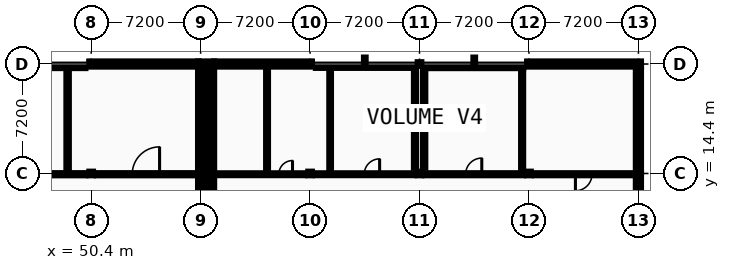
"""IFC4 building model, lengths in metres.
Left out: names, types, materials, properties, quantities, classifications, styles, units other than length and angle.
Written with IfcOpenShell. Run it as: python <this file> out.ifc"""

import sys

from ifc_helpers import new_model, si_unit, direction, frame, frame_2d, origin, origin_2d, place, context, subcontext, project, spatial, rectangle, i_section, extrude, element, fill, save


model = new_model("IFC4")
c1 = context("Model", 3, precision=1e-05, world=origin(), true_north=direction((0.0, 1.0)))
c2 = subcontext(c1, "Body", "Model", "MODEL_VIEW")
j1 = project(units=[si_unit("LENGTHUNIT", "METRE"), si_unit("PLANEANGLEUNIT", "RADIAN")], contexts=[c1])
p1 = place(None, origin())
s1 = spatial("IfcSite", under=j1, at=p1, CompositionType="ELEMENT")
p2 = place(p1, origin())
s2 = spatial("IfcBuilding", under=s1, at=p2, CompositionType="ELEMENT")
p3 = place(p2, frame((0.0, 0.0, 18.4)))
s3 = spatial("IfcBuildingStorey", under=s2, at=p3, CompositionType="ELEMENT", Elevation=18.4)
for number, where, z_axis, x_axis in (
    (1, (50.4, 14.4, 0.0), (0.0, 0.0, 1.0), (1.0, 0.0, 0.0)),
    (2, (50.4, 21.6, 0.0), (0.0, 0.0, 1.0), (1.0, 0.0, 0.0)),
    (3, (57.6, 14.4, 0.0), (0.0, 0.0, 1.0), (1.0, 0.0, 0.0)),
    (4, (57.6, 21.6, 0.0), (0.0, 0.0, 1.0), (1.0, 0.0, 0.0)),
    (5, (58.32, 14.4, 0.0), (0.0, 0.0, 1.0), (1.0, 0.0, 0.0)),
    (6, (58.32, 21.6, 0.0), (0.0, 0.0, 1.0), (1.0, 0.0, 0.0)),
    (7, (64.8, 14.4, 0.0), (0.0, 0.0, 1.0), (1.0, 0.0, 0.0)),
    (8, (64.8, 21.6, 0.0), (0.0, 0.0, 1.0), (1.0, 0.0, 0.0)),
    (9, (72.0, 14.4, 0.0), (0.0, 0.0, 1.0), (1.0, 0.0, 0.0)),
    (10, (72.0, 21.6, 0.0), (0.0, 0.0, 1.0), (1.0, 0.0, 0.0)),
    (11, (79.2, 14.4, 0.0), (0.0, 0.0, 1.0), (1.0, 0.0, 0.0)),
    (12, (79.2, 21.6, 0.0), (0.0, 0.0, 1.0), (1.0, 0.0, 0.0)),
    (13, (86.4, 14.4, 0.0), (0.0, 0.0, 1.0), (1.0, 0.0, 0.0)),
    (14, (86.4, 21.6, 0.0), (0.0, 0.0, 1.0), (1.0, 0.0, 0.0)),
):
    element("IfcColumn", number, at=place(p3, frame(where, z_axis=z_axis, x_axis=x_axis)), inside=s3, PredefinedType="COLUMN", context=c2, shape_type="SweptSolid", body=[
        extrude(i_section(OverallWidth=0.24, OverallDepth=0.24, WebThickness=0.01, FlangeThickness=0.017, FilletRadius=0.021, at=origin_2d()), origin(), (0.0, 0.0, 1.0), 4.4),
    ])
p4 = place(p3, frame((57.43, 21.6, 0.0), z_axis=(0.0, 0.0, 1.0), x_axis=(-1.0, 0.0, 0.0)))
e15 = element("IfcWall", 15, at=p4, inside=s3, PredefinedType="STANDARD", context=c2, shape_type="SweptSolid", body=[
    extrude(rectangle(XDim=7.14, YDim=0.34, at=frame_2d((3.57, 0.0))), origin(), (0.0, 0.0, 1.0), 4.035),
])
p5 = place(p4, frame((1.542, 0.0, 0.95)))
e16 = element("IfcOpeningElement", 16, at=p5, cuts=e15, PredefinedType="OPENING", context=c2, shape_type="SweptSolid", body=[
    extrude(rectangle(XDim=1.2, YDim=1.404, at=frame_2d((0.6, 0.702))), frame((0.0, 0.18, 0.0), z_axis=(0.0, -1.0, 0.0), x_axis=(1.0, 0.0, 0.0)), (0.0, 0.0, 1.0), 0.36),
])
p6 = place(p4, frame((4.398, 0.0, 0.95)))
e17 = element("IfcOpeningElement", 17, at=p6, cuts=e15, PredefinedType="OPENING", context=c2, shape_type="SweptSolid", body=[
    extrude(rectangle(XDim=1.2, YDim=1.404, at=frame_2d((0.6, 0.702))), frame((0.0, 0.18, 0.0), z_axis=(0.0, -1.0, 0.0), x_axis=(1.0, 0.0, 0.0)), (0.0, 0.0, 1.0), 0.36),
])
p7 = place(p3, frame((57.6, 8.9, 0.0), z_axis=(0.0, 0.0, 1.0), x_axis=(0.0, 1.0, 0.0)))
e18 = element("IfcWall", 18, at=p7, inside=s3, PredefinedType="STANDARD", context=c2, shape_type="SweptSolid", body=[
    extrude(rectangle(XDim=5.5, YDim=0.34, at=frame_2d((2.75, 0.0))), origin(), (0.0, 0.0, 1.0), 4.11),
])
p8 = place(p3, frame((57.6, 14.4, 0.0), z_axis=(0.0, 0.0, 1.0), x_axis=(0.0, 1.0, 0.0)))
e19 = element("IfcWall", 19, at=p8, inside=s3, PredefinedType="STANDARD", context=c2, shape_type="SweptSolid", body=[
    extrude(rectangle(XDim=7.37, YDim=0.34, at=frame_2d((3.685, 0.0))), origin(), (0.0, 0.0, 1.0), 4.11),
])
p9 = place(p8, frame((1.311, 0.0, 0.95)))
e20 = element("IfcOpeningElement", 20, at=p9, cuts=e19, PredefinedType="OPENING", context=c2, shape_type="SweptSolid", body=[
    extrude(rectangle(XDim=1.8, YDim=1.85, at=frame_2d((0.9, 0.925))), frame((0.0, 0.18, 0.0), z_axis=(0.0, -1.0, 0.0), x_axis=(1.0, 0.0, 0.0)), (0.0, 0.0, 1.0), 0.36),
])
p10 = place(p8, frame((4.259, 0.0, 0.95)))
e21 = element("IfcOpeningElement", 21, at=p10, cuts=e19, PredefinedType="OPENING", context=c2, shape_type="SweptSolid", body=[
    extrude(rectangle(XDim=1.8, YDim=1.85, at=frame_2d((0.9, 0.925))), frame((0.0, 0.18, 0.0), z_axis=(0.0, -1.0, 0.0), x_axis=(1.0, 0.0, 0.0)), (0.0, 0.0, 1.0), 0.36),
])
p11 = place(p3, frame((64.91, 21.6, 0.0), z_axis=(0.0, 0.0, 1.0), x_axis=(-1.0, 0.0, 0.0)))
e22 = element("IfcWall", 22, at=p11, inside=s3, PredefinedType="STANDARD", context=c2, shape_type="SweptSolid", body=[
    extrude(rectangle(XDim=6.42, YDim=0.34, at=frame_2d((3.21, 0.0))), origin(), (0.0, 0.0, 1.0), 4.035),
])
p12 = place(p3, frame((86.57, 21.6, 0.0), z_axis=(0.0, 0.0, 1.0), x_axis=(-1.0, 0.0, 0.0)))
e23 = element("IfcWall", 23, at=p12, inside=s3, PredefinedType="STANDARD", context=c2, shape_type="SweptSolid", body=[
    extrude(rectangle(XDim=7.48, YDim=0.34, at=frame_2d((3.74, 0.0))), origin(), (0.0, 0.0, 1.0), 4.035),
])
p13 = place(p12, frame((1.661, 0.0, 0.95)))
e24 = element("IfcOpeningElement", 24, at=p13, cuts=e23, PredefinedType="OPENING", context=c2, shape_type="SweptSolid", body=[
    extrude(rectangle(XDim=1.166, YDim=1.368, at=frame_2d((0.583, 0.684))), frame((0.0, 0.18, 0.0), z_axis=(0.0, -1.0, 0.0), x_axis=(1.0, 0.0, 0.0)), (0.0, 0.0, 1.0), 0.36),
])
p14 = place(p12, frame((4.653, 0.0, 0.95)))
e25 = element("IfcOpeningElement", 25, at=p14, cuts=e23, PredefinedType="OPENING", context=c2, shape_type="SweptSolid", body=[
    extrude(rectangle(XDim=1.166, YDim=1.368, at=frame_2d((0.583, 0.684))), frame((0.0, 0.18, 0.0), z_axis=(0.0, -1.0, 0.0), x_axis=(1.0, 0.0, 0.0)), (0.0, 0.0, 1.0), 0.36),
])
p15 = place(p3, frame((58.32, 14.4, 0.0), z_axis=(0.0, 0.0, 1.0), x_axis=(0.0, -1.0, 0.0)))
e26 = element("IfcWall", 26, at=p15, inside=s3, PredefinedType="STANDARD", context=c2, shape_type="SweptSolid", body=[
    extrude(rectangle(XDim=5.5, YDim=0.34, at=frame_2d((2.75, 0.0))), origin(), (0.0, 0.0, 1.0), 4.11),
])
p16 = place(p3, frame((58.32, 21.77, 0.0), z_axis=(0.0, 0.0, 1.0), x_axis=(0.0, -1.0, 0.0)))
e27 = element("IfcWall", 27, at=p16, inside=s3, PredefinedType="STANDARD", context=c2, shape_type="SweptSolid", body=[
    extrude(rectangle(XDim=7.37, YDim=0.34, at=frame_2d((3.685, 0.0))), origin(), (0.0, 0.0, 1.0), 4.11),
])
p17 = place(p16, frame((1.594, 0.0, 0.95)))
e28 = element("IfcOpeningElement", 28, at=p17, cuts=e27, PredefinedType="OPENING", context=c2, shape_type="SweptSolid", body=[
    extrude(rectangle(XDim=1.234, YDim=1.368, at=frame_2d((0.617, 0.684))), frame((0.0, 0.18, 0.0), z_axis=(0.0, -1.0, 0.0), x_axis=(1.0, 0.0, 0.0)), (0.0, 0.0, 1.0), 0.36),
])
p18 = place(p16, frame((4.542, 0.0, 0.95)))
e29 = element("IfcOpeningElement", 29, at=p18, cuts=e27, PredefinedType="OPENING", context=c2, shape_type="SweptSolid", body=[
    extrude(rectangle(XDim=1.234, YDim=1.368, at=frame_2d((0.617, 0.684))), frame((0.0, 0.18, 0.0), z_axis=(0.0, -1.0, 0.0), x_axis=(1.0, 0.0, 0.0)), (0.0, 0.0, 1.0), 0.36),
])
p19 = place(p3, frame((86.4, 8.9, 0.0), z_axis=(0.0, 0.0, 1.0), x_axis=(0.0, 1.0, 0.0)))
e30 = element("IfcWall", 30, at=p19, inside=s3, PredefinedType="STANDARD", context=c2, shape_type="SweptSolid", body=[
    extrude(rectangle(XDim=5.5, YDim=0.34, at=frame_2d((2.75, 0.0))), origin(), (0.0, 0.0, 1.0), 4.11),
])
p20 = place(p3, frame((86.4, 14.4, 0.0), z_axis=(0.0, 0.0, 1.0), x_axis=(0.0, 1.0, 0.0)))
e31 = element("IfcWall", 31, at=p20, inside=s3, PredefinedType="STANDARD", context=c2, shape_type="SweptSolid", body=[
    extrude(rectangle(XDim=7.03, YDim=0.34, at=frame_2d((3.515, 0.0))), origin(), (0.0, 0.0, 1.0), 4.11),
])
p21 = place(p20, frame((1.679, 0.0, 0.95)))
e32 = element("IfcOpeningElement", 32, at=p21, cuts=e31, PredefinedType="OPENING", context=c2, shape_type="SweptSolid", body=[
    extrude(rectangle(XDim=0.86, YDim=1.404, at=frame_2d((0.43, 0.702))), frame((0.0, 0.18, 0.0), z_axis=(0.0, -1.0, 0.0), x_axis=(1.0, 0.0, 0.0)), (0.0, 0.0, 1.0), 0.36),
])
p22 = place(p20, frame((4.491, 0.0, 0.95)))
e33 = element("IfcOpeningElement", 33, at=p22, cuts=e31, PredefinedType="OPENING", context=c2, shape_type="SweptSolid", body=[
    extrude(rectangle(XDim=0.86, YDim=1.404, at=frame_2d((0.43, 0.702))), frame((0.0, 0.18, 0.0), z_axis=(0.0, -1.0, 0.0), x_axis=(1.0, 0.0, 0.0)), (0.0, 0.0, 1.0), 0.36),
])
p23 = place(p3, frame((58.32, 0.2, 4.4), z_axis=(0.0, 0.0, 1.0), x_axis=(0.0, 1.0, 0.0)))
e34 = element("IfcWall", 34, at=p23, inside=s3, PredefinedType="PARAPET", context=c2, shape_type="SweptSolid", body=[
    extrude(rectangle(XDim=21.2, YDim=0.2, at=frame_2d((10.6, 0.0))), origin(), (0.0, 0.0, 1.0), 0.55),
])
p24 = place(p3, frame((43.58, 14.35, 0.0), z_axis=(0.0, 0.0, 1.0), x_axis=(1.0, 0.0, 0.0)))
e35 = element("IfcWall", 35, at=p24, inside=s3, PredefinedType="PARTITIONING", context=c2, shape_type="SweptSolid", body=[
    extrude(rectangle(XDim=6.44, YDim=0.142, at=frame_2d((3.22, 0.0))), origin(), (0.0, 0.0, 1.0), 4.035),
])
p25 = place(p24, frame((2.156, 0.0, 0.0)))
e36 = element("IfcOpeningElement", 36, at=p25, cuts=e35, PredefinedType="OPENING", context=c2, shape_type="SweptSolid", body=[
    extrude(rectangle(XDim=0.958, YDim=2.068, at=frame_2d((0.479, 1.034))), frame((0.0, 0.081, 0.0), z_axis=(0.0, -1.0, 0.0), x_axis=(1.0, 0.0, 0.0)), (0.0, 0.0, 1.0), 0.162),
])
p26 = place(p3, frame((50.78, 14.35, 0.0), z_axis=(0.0, 0.0, 1.0), x_axis=(1.0, 0.0, 0.0)))
e37 = element("IfcWall", 37, at=p26, inside=s3, PredefinedType="PARTITIONING", context=c2, shape_type="SweptSolid", body=[
    extrude(rectangle(XDim=6.44, YDim=0.142, at=frame_2d((3.22, 0.0))), origin(), (0.0, 0.0, 1.0), 4.035),
])
p27 = place(p26, frame((2.32, 0.0, 0.0)))
e38 = element("IfcOpeningElement", 38, at=p27, cuts=e37, PredefinedType="OPENING", context=c2, shape_type="SweptSolid", body=[
    extrude(rectangle(XDim=1.8, YDim=2.3, at=frame_2d((0.9, 1.15))), frame((0.0, 0.081, 0.0), z_axis=(0.0, -1.0, 0.0), x_axis=(1.0, 0.0, 0.0)), (0.0, 0.0, 1.0), 0.162),
])
p28 = place(p3, frame((58.7, 14.35, 0.0), z_axis=(0.0, 0.0, 1.0), x_axis=(1.0, 0.0, 0.0)))
e39 = element("IfcWall", 39, at=p28, inside=s3, PredefinedType="PARTITIONING", context=c2, shape_type="SweptSolid", body=[
    extrude(rectangle(XDim=5.72, YDim=0.125, at=frame_2d((2.86, 0.0))), origin(), (0.0, 0.0, 1.0), 4.035),
])
p29 = place(p28, frame((1.82, 0.0, 0.0)))
e40 = element("IfcOpeningElement", 40, at=p29, cuts=e39, PredefinedType="OPENING", context=c2, shape_type="SweptSolid", body=[
    extrude(rectangle(XDim=1.0, YDim=2.1, at=frame_2d((0.5, 1.05))), frame((0.0, 0.073, 0.0), z_axis=(0.0, -1.0, 0.0), x_axis=(1.0, 0.0, 0.0)), (0.0, 0.0, 1.0), 0.145),
])
p30 = place(p28, frame((4.045, 0.0, 0.0)))
e41 = element("IfcOpeningElement", 41, at=p30, cuts=e39, PredefinedType="OPENING", context=c2, shape_type="SweptSolid", body=[
    extrude(rectangle(XDim=0.9, YDim=2.1, at=frame_2d((0.45, 1.05))), frame((0.0, 0.073, 0.0), z_axis=(0.0, -1.0, 0.0), x_axis=(1.0, 0.0, 0.0)), (0.0, 0.0, 1.0), 0.145),
])
p31 = place(p3, frame((65.18, 14.35, 0.0), z_axis=(0.0, 0.0, 1.0), x_axis=(1.0, 0.0, 0.0)))
e42 = element("IfcWall", 42, at=p31, inside=s3, PredefinedType="PARTITIONING", context=c2, shape_type="SweptSolid", body=[
    extrude(rectangle(XDim=6.44, YDim=0.125, at=frame_2d((3.22, 0.0))), origin(), (0.0, 0.0, 1.0), 4.035),
])
p32 = place(p31, frame((3.185, 0.0, 0.0)))
e43 = element("IfcOpeningElement", 43, at=p32, cuts=e42, PredefinedType="OPENING", context=c2, shape_type="SweptSolid", body=[
    extrude(rectangle(XDim=1.01, YDim=2.068, at=frame_2d((0.505, 1.034))), frame((0.0, 0.073, 0.0), z_axis=(0.0, -1.0, 0.0), x_axis=(1.0, 0.0, 0.0)), (0.0, 0.0, 1.0), 0.145),
])
p33 = place(p3, frame((72.38, 14.35, 0.0), z_axis=(0.0, 0.0, 1.0), x_axis=(1.0, 0.0, 0.0)))
e44 = element("IfcWall", 44, at=p33, inside=s3, PredefinedType="PARTITIONING", context=c2, shape_type="SweptSolid", body=[
    extrude(rectangle(XDim=6.44, YDim=0.135, at=frame_2d((3.22, 0.0))), origin(), (0.0, 0.0, 1.0), 4.035),
])
p34 = place(p33, frame((2.654, 0.0, 0.0)))
e45 = element("IfcOpeningElement", 45, at=p34, cuts=e44, PredefinedType="OPENING", context=c2, shape_type="SweptSolid", body=[
    extrude(rectangle(XDim=1.062, YDim=2.068, at=frame_2d((0.531, 1.034))), frame((0.0, 0.078, 0.0), z_axis=(0.0, -1.0, 0.0), x_axis=(1.0, 0.0, 0.0)), (0.0, 0.0, 1.0), 0.155),
])
p35 = place(p3, frame((79.58, 14.35, 0.0), z_axis=(0.0, 0.0, 1.0), x_axis=(1.0, 0.0, 0.0)))
e46 = element("IfcWall", 46, at=p35, inside=s3, PredefinedType="PARTITIONING", context=c2, shape_type="SweptSolid", body=[
    extrude(rectangle(XDim=6.44, YDim=0.135, at=frame_2d((3.22, 0.0))), origin(), (0.0, 0.0, 1.0), 4.035),
])
p36 = place(p35, frame((2.676, 0.0, 0.0)))
e47 = element("IfcOpeningElement", 47, at=p36, cuts=e46, PredefinedType="OPENING", context=c2, shape_type="SweptSolid", body=[
    extrude(rectangle(XDim=1.088, YDim=2.068, at=frame_2d((0.544, 1.034))), frame((0.0, 0.078, 0.0), z_axis=(0.0, -1.0, 0.0), x_axis=(1.0, 0.0, 0.0)), (0.0, 0.0, 1.0), 0.155),
])
p37 = place(p3, frame((43.58, 21.4, 0.0), z_axis=(0.0, 0.0, 1.0), x_axis=(1.0, 0.0, 0.0)))
e48 = element("IfcWall", 48, at=p37, inside=s3, PredefinedType="PARTITIONING", context=c2, shape_type="SweptSolid", body=[
    extrude(rectangle(XDim=6.44, YDim=0.135, at=frame_2d((3.22, 0.0))), origin(), (0.0, 0.0, 1.0), 4.035),
])
p38 = place(p3, frame((65.18, 21.4, 0.0), z_axis=(0.0, 0.0, 1.0), x_axis=(1.0, 0.0, 0.0)))
e49 = element("IfcWall", 49, at=p38, inside=s3, PredefinedType="PARTITIONING", context=c2, shape_type="SweptSolid", body=[
    extrude(rectangle(XDim=6.44, YDim=0.11, at=frame_2d((3.22, 0.0))), origin(), (0.0, 0.0, 1.0), 4.035),
])
p39 = place(p3, frame((72.38, 21.4, 0.0), z_axis=(0.0, 0.0, 1.0), x_axis=(1.0, 0.0, 0.0)))
e50 = element("IfcWall", 50, at=p39, inside=s3, PredefinedType="PARTITIONING", context=c2, shape_type="SweptSolid", body=[
    extrude(rectangle(XDim=6.44, YDim=0.142, at=frame_2d((3.22, 0.0))), origin(), (0.0, 0.0, 1.0), 4.035),
])
p40 = place(p3, frame((48.85, 14.421, 0.0), z_axis=(0.0, 0.0, 1.0), x_axis=(0.0, 1.0, 0.0)))
e51 = element("IfcWall", 51, at=p40, inside=s3, PredefinedType="PARTITIONING", context=c2, shape_type="SweptSolid", body=[
    extrude(rectangle(XDim=6.912, YDim=0.16, at=frame_2d((3.456, 0.0))), origin(), (0.0, 0.0, 1.0), 4.18),
])
p41 = place(p3, frame((61.97, 14.413, 0.0), z_axis=(0.0, 0.0, 1.0), x_axis=(0.0, 1.0, 0.0)))
e52 = element("IfcWall", 52, at=p41, inside=s3, PredefinedType="PARTITIONING", context=c2, shape_type="SweptSolid", body=[
    extrude(rectangle(XDim=6.987, YDim=0.125, at=frame_2d((3.494, 0.0))), origin(), (0.0, 0.0, 1.0), 4.18),
])
p42 = place(p3, frame((66.12, 14.413, 0.0), z_axis=(0.0, 0.0, 1.0), x_axis=(0.0, 1.0, 0.0)))
e53 = element("IfcWall", 53, at=p42, inside=s3, PredefinedType="PARTITIONING", context=c2, shape_type="SweptSolid", body=[
    extrude(rectangle(XDim=6.932, YDim=0.11, at=frame_2d((3.466, 0.0))), origin(), (0.0, 0.0, 1.0), 4.18),
])
p43 = place(p3, frame((71.7, 14.78, 0.0), z_axis=(0.0, 0.0, 1.0), x_axis=(0.0, 1.0, 0.0)))
e54 = element("IfcWall", 54, at=p43, inside=s3, PredefinedType="PARTITIONING", context=c2, shape_type="SweptSolid", body=[
    extrude(rectangle(XDim=6.44, YDim=0.135, at=frame_2d((3.22, 0.0))), origin(), (0.0, 0.0, 1.0), 4.18),
])
p44 = place(p3, frame((72.3, 14.78, 0.0), z_axis=(0.0, 0.0, 1.0), x_axis=(0.0, 1.0, 0.0)))
e55 = element("IfcWall", 55, at=p44, inside=s3, PredefinedType="PARTITIONING", context=c2, shape_type="SweptSolid", body=[
    extrude(rectangle(XDim=6.44, YDim=0.16, at=frame_2d((3.22, 0.0))), origin(), (0.0, 0.0, 1.0), 4.18),
])
p45 = place(p3, frame((78.75, 14.417, 0.0), z_axis=(0.0, 0.0, 1.0), x_axis=(0.0, 1.0, 0.0)))
e56 = element("IfcWall", 56, at=p45, inside=s3, PredefinedType="PARTITIONING", context=c2, shape_type="SweptSolid", body=[
    extrude(rectangle(XDim=6.912, YDim=0.135, at=frame_2d((3.456, 0.0))), origin(), (0.0, 0.0, 1.0), 4.18),
])
p46 = place(p5, origin())
e57 = element("IfcWindow", 57, at=p46, inside=s3, PartitioningType="SINGLE_PANEL", PredefinedType="WINDOW", context=c2, shape_type="SweptSolid", body=[
    extrude(rectangle(XDim=1.2, YDim=1.404, at=frame_2d((0.6, 0.702))), frame((0.0, 0.03, 0.0), z_axis=(0.0, -1.0, 0.0), x_axis=(1.0, 0.0, 0.0)), (0.0, 0.0, 1.0), 0.06),
])
fill(e16, e57)
p47 = place(p6, origin())
e58 = element("IfcWindow", 58, at=p47, inside=s3, PartitioningType="SINGLE_PANEL", PredefinedType="WINDOW", context=c2, shape_type="SweptSolid", body=[
    extrude(rectangle(XDim=1.2, YDim=1.404, at=frame_2d((0.6, 0.702))), frame((0.0, 0.03, 0.0), z_axis=(0.0, -1.0, 0.0), x_axis=(1.0, 0.0, 0.0)), (0.0, 0.0, 1.0), 0.06),
])
fill(e17, e58)
p48 = place(p9, origin())
e59 = element("IfcWindow", 59, at=p48, inside=s3, PartitioningType="SINGLE_PANEL", PredefinedType="WINDOW", context=c2, shape_type="SweptSolid", body=[
    extrude(rectangle(XDim=1.8, YDim=1.85, at=frame_2d((0.9, 0.925))), frame((0.0, 0.03, 0.0), z_axis=(0.0, -1.0, 0.0), x_axis=(1.0, 0.0, 0.0)), (0.0, 0.0, 1.0), 0.06),
])
fill(e20, e59)
p49 = place(p10, origin())
e60 = element("IfcWindow", 60, at=p49, inside=s3, PartitioningType="SINGLE_PANEL", PredefinedType="WINDOW", context=c2, shape_type="SweptSolid", body=[
    extrude(rectangle(XDim=1.8, YDim=1.85, at=frame_2d((0.9, 0.925))), frame((0.0, 0.03, 0.0), z_axis=(0.0, -1.0, 0.0), x_axis=(1.0, 0.0, 0.0)), (0.0, 0.0, 1.0), 0.06),
])
fill(e21, e60)
p50 = place(p13, origin())
e61 = element("IfcWindow", 61, at=p50, inside=s3, PartitioningType="SINGLE_PANEL", PredefinedType="WINDOW", context=c2, shape_type="SweptSolid", body=[
    extrude(rectangle(XDim=1.166, YDim=1.368, at=frame_2d((0.583, 0.684))), frame((0.0, 0.03, 0.0), z_axis=(0.0, -1.0, 0.0), x_axis=(1.0, 0.0, 0.0)), (0.0, 0.0, 1.0), 0.06),
])
fill(e24, e61)
p51 = place(p14, origin())
e62 = element("IfcWindow", 62, at=p51, inside=s3, PartitioningType="SINGLE_PANEL", PredefinedType="WINDOW", context=c2, shape_type="SweptSolid", body=[
    extrude(rectangle(XDim=1.166, YDim=1.368, at=frame_2d((0.583, 0.684))), frame((0.0, 0.03, 0.0), z_axis=(0.0, -1.0, 0.0), x_axis=(1.0, 0.0, 0.0)), (0.0, 0.0, 1.0), 0.06),
])
fill(e25, e62)
p52 = place(p17, origin())
e63 = element("IfcWindow", 63, at=p52, inside=s3, PartitioningType="SINGLE_PANEL", PredefinedType="WINDOW", context=c2, shape_type="SweptSolid", body=[
    extrude(rectangle(XDim=1.234, YDim=1.368, at=frame_2d((0.617, 0.684))), frame((0.0, 0.03, 0.0), z_axis=(0.0, -1.0, 0.0), x_axis=(1.0, 0.0, 0.0)), (0.0, 0.0, 1.0), 0.06),
])
fill(e28, e63)
p53 = place(p18, origin())
e64 = element("IfcWindow", 64, at=p53, inside=s3, PartitioningType="SINGLE_PANEL", PredefinedType="WINDOW", context=c2, shape_type="SweptSolid", body=[
    extrude(rectangle(XDim=1.234, YDim=1.368, at=frame_2d((0.617, 0.684))), frame((0.0, 0.03, 0.0), z_axis=(0.0, -1.0, 0.0), x_axis=(1.0, 0.0, 0.0)), (0.0, 0.0, 1.0), 0.06),
])
fill(e29, e64)
p54 = place(p21, origin())
e65 = element("IfcWindow", 65, at=p54, inside=s3, PartitioningType="SINGLE_PANEL", PredefinedType="WINDOW", context=c2, shape_type="SweptSolid", body=[
    extrude(rectangle(XDim=0.86, YDim=1.404, at=frame_2d((0.43, 0.702))), frame((0.0, 0.03, 0.0), z_axis=(0.0, -1.0, 0.0), x_axis=(1.0, 0.0, 0.0)), (0.0, 0.0, 1.0), 0.06),
])
fill(e32, e65)
p55 = place(p22, origin())
e66 = element("IfcWindow", 66, at=p55, inside=s3, PartitioningType="SINGLE_PANEL", PredefinedType="WINDOW", context=c2, shape_type="SweptSolid", body=[
    extrude(rectangle(XDim=0.86, YDim=1.404, at=frame_2d((0.43, 0.702))), frame((0.0, 0.03, 0.0), z_axis=(0.0, -1.0, 0.0), x_axis=(1.0, 0.0, 0.0)), (0.0, 0.0, 1.0), 0.06),
])
fill(e33, e66)
p56 = place(p27, frame((1.8, 0.0, 0.0), z_axis=(0.0, 0.0, 1.0), x_axis=(-1.0, 0.0, 0.0)))
e67 = element("IfcDoor", 67, at=p56, inside=s3, OperationType="DOUBLE_DOOR_SINGLE_SWING", PredefinedType="DOOR", context=c2, shape_type="SweptSolid", body=[
    extrude(rectangle(XDim=1.8, YDim=2.3, at=frame_2d((0.9, 1.15))), frame((0.0, 0.025, 0.0), z_axis=(0.0, -1.0, 0.0), x_axis=(1.0, 0.0, 0.0)), (0.0, 0.0, 1.0), 0.05),
])
fill(e38, e67)
p57 = place(p29, frame((1.0, 0.0, 0.0), z_axis=(0.0, 0.0, 1.0), x_axis=(-1.0, 0.0, 0.0)))
e68 = element("IfcDoor", 68, at=p57, inside=s3, OperationType="SLIDING_TO_LEFT", PredefinedType="DOOR", context=c2, shape_type="SweptSolid", body=[
    extrude(rectangle(XDim=1.0, YDim=2.1, at=frame_2d((0.5, 1.05))), frame((0.0, 0.025, 0.0), z_axis=(0.0, -1.0, 0.0), x_axis=(1.0, 0.0, 0.0)), (0.0, 0.0, 1.0), 0.05),
])
fill(e40, e68)
p58 = place(p30, frame((0.9, 0.0, 0.0), z_axis=(0.0, 0.0, 1.0), x_axis=(-1.0, 0.0, 0.0)))
e69 = element("IfcDoor", 69, at=p58, inside=s3, OperationType="SINGLE_SWING_RIGHT", PredefinedType="DOOR", context=c2, shape_type="SweptSolid", body=[
    extrude(rectangle(XDim=0.9, YDim=2.1, at=frame_2d((0.45, 1.05))), frame((0.0, 0.025, 0.0), z_axis=(0.0, -1.0, 0.0), x_axis=(1.0, 0.0, 0.0)), (0.0, 0.0, 1.0), 0.05),
])
fill(e41, e69)
p59 = place(p32, frame((1.01, 0.0, 0.0), z_axis=(0.0, 0.0, 1.0), x_axis=(-1.0, 0.0, 0.0)))
e70 = element("IfcDoor", 70, at=p59, inside=s3, OperationType="SINGLE_SWING_RIGHT", PredefinedType="DOOR", context=c2, shape_type="SweptSolid", body=[
    extrude(rectangle(XDim=1.01, YDim=2.068, at=frame_2d((0.505, 1.034))), frame((0.0, 0.025, 0.0), z_axis=(0.0, -1.0, 0.0), x_axis=(1.0, 0.0, 0.0)), (0.0, 0.0, 1.0), 0.05),
])
fill(e43, e70)
p60 = place(p34, frame((1.062, 0.0, 0.0), z_axis=(0.0, 0.0, 1.0), x_axis=(-1.0, 0.0, 0.0)))
e71 = element("IfcDoor", 71, at=p60, inside=s3, OperationType="SINGLE_SWING_RIGHT", PredefinedType="DOOR", context=c2, shape_type="SweptSolid", body=[
    extrude(rectangle(XDim=1.062, YDim=2.068, at=frame_2d((0.531, 1.034))), frame((0.0, 0.025, 0.0), z_axis=(0.0, -1.0, 0.0), x_axis=(1.0, 0.0, 0.0)), (0.0, 0.0, 1.0), 0.05),
])
fill(e45, e71)
p61 = place(p36, frame((1.088, 0.0, 0.0), z_axis=(0.0, 0.0, 1.0), x_axis=(-1.0, 0.0, 0.0)))
e72 = element("IfcDoor", 72, at=p61, inside=s3, OperationType="SINGLE_SWING_LEFT", PredefinedType="DOOR", context=c2, shape_type="SweptSolid", body=[
    extrude(rectangle(XDim=1.088, YDim=2.068, at=frame_2d((0.544, 1.034))), frame((0.0, 0.025, 0.0), z_axis=(0.0, -1.0, 0.0), x_axis=(1.0, 0.0, 0.0)), (0.0, 0.0, 1.0), 0.05),
])
fill(e47, e72)
save(model, sys.argv[1])
